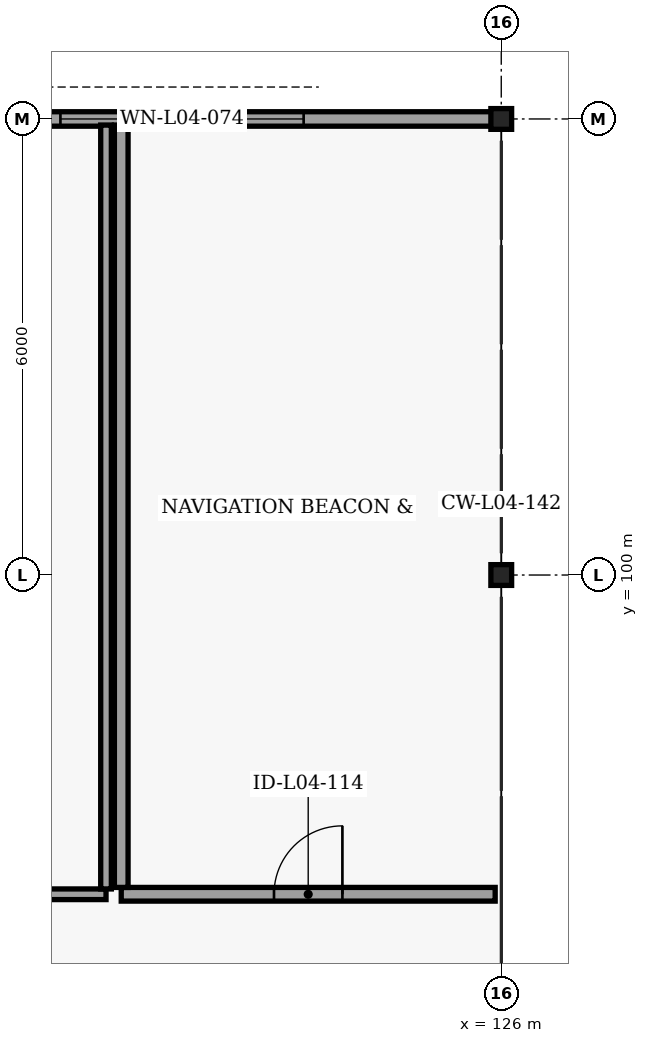
"""IFC4 building model, lengths in metres.
Left out: names, types, materials, properties, quantities, classifications, styles, units other than length and angle.
Written with IfcOpenShell. Run it as: python <this file> out.ifc"""

import sys

from ifc_helpers import new_model, si_unit, direction, frame, frame_2d, origin, origin_2d, place, context, subcontext, project, spatial, rectangle, hollow_circle, extrude, element, fill, save


model = new_model("IFC4")
c1 = context("Model", 3, precision=1e-05, world=origin(), true_north=direction((0.0, 1.0)))
c2 = subcontext(c1, "Body", "Model", "MODEL_VIEW")
j1 = project(units=[si_unit("LENGTHUNIT", "METRE"), si_unit("PLANEANGLEUNIT", "RADIAN")], contexts=[c1])
p1 = place(None, origin())
s1 = spatial("IfcSite", under=j1, at=p1, CompositionType="ELEMENT")
p2 = place(p1, origin())
s2 = spatial("IfcBuilding", under=s1, at=p2, CompositionType="ELEMENT")
p3 = place(p2, frame((0.0, 0.0, 14.4)))
s3 = spatial("IfcBuildingStorey", under=s2, at=p3, CompositionType="ELEMENT", Elevation=14.4)
for number, where, z_axis, x_axis in (
    (1, (126.0, 100.0, 0.0), (0.0, 0.0, 1.0), (1.0, 0.0, 0.0)),
    (2, (126.0, 106.0, 0.0), (0.0, 0.0, 1.0), (1.0, 0.0, 0.0)),
):
    element("IfcColumn", number, at=place(p3, frame(where, z_axis=z_axis, x_axis=x_axis)), inside=s3, PredefinedType="COLUMN", context=c2, shape_type="SweptSolid", body=[
        extrude(hollow_circle(Radius=0.136, WallThickness=0.01, at=origin_2d()), origin(), (0.0, 0.0, 1.0), 3.85),
    ])
p4 = place(p3, frame((117.738, 106.0, 0.0), z_axis=(0.0, 0.0, 1.0), x_axis=(1.0, 0.0, 0.0)))
e3 = element("IfcWall", 3, at=p4, inside=s3, PredefinedType="SOLIDWALL", context=c2, shape_type="SweptSolid", body=[
    extrude(rectangle(XDim=8.14, YDim=0.19, at=frame_2d((4.07, 0.0))), origin(), (0.0, 0.0, 1.0), 3.438),
])
p5 = place(p4, frame((2.462, 0.0, 0.85)))
e4 = element("IfcOpeningElement", 4, at=p5, cuts=e3, PredefinedType="OPENING", context=c2, shape_type="SweptSolid", body=[
    extrude(rectangle(XDim=3.2, YDim=1.8, at=frame_2d((1.6, 0.9))), frame((0.0, 0.105, 0.0), z_axis=(0.0, -1.0, 0.0), x_axis=(1.0, 0.0, 0.0)), (0.0, 0.0, 1.0), 0.21),
])
p6 = place(p3, frame((115.8, 95.8, 0.0), z_axis=(0.0, 0.0, 1.0), x_axis=(1.0, 0.0, 0.0)))
e5 = element("IfcWall", 5, at=p6, inside=s3, PredefinedType="PARTITIONING", context=c2, shape_type="SweptSolid", body=[
    extrude(rectangle(XDim=5.0, YDim=0.14, at=frame_2d((2.5, 0.0))), origin(), (0.0, 0.0, 1.0), 3.44),
])
p7 = place(p6, frame((2.0, 0.0, 0.0)))
e6 = element("IfcOpeningElement", 6, at=p7, cuts=e5, PredefinedType="OPENING", context=c2, shape_type="SweptSolid", body=[
    extrude(rectangle(XDim=1.0, YDim=2.15, at=frame_2d((0.5, 1.075))), frame((0.0, 0.08, 0.0), z_axis=(0.0, -1.0, 0.0), x_axis=(1.0, 0.0, 0.0)), (0.0, 0.0, 1.0), 0.16),
])
p8 = place(p3, frame((120.8, 95.87, 0.0), z_axis=(0.0, 0.0, 1.0), x_axis=(0.0, 1.0, 0.0)))
e7 = element("IfcWall", 7, at=p8, inside=s3, PredefinedType="PARTITIONING", context=c2, shape_type="SweptSolid", body=[
    extrude(rectangle(XDim=10.05, YDim=0.14, at=frame_2d((5.025, 0.0))), origin(), (0.0, 0.0, 1.0), 3.44),
])
p9 = place(p3, frame((121.0, 95.8, 0.0), z_axis=(0.0, 0.0, 1.0), x_axis=(1.0, 0.0, 0.0)))
e8 = element("IfcWall", 8, at=p9, inside=s3, PredefinedType="SOLIDWALL", context=c2, shape_type="SweptSolid", body=[
    extrude(rectangle(XDim=4.92, YDim=0.18, at=frame_2d((2.46, 0.0))), origin(), (0.0, 0.0, 1.0), 3.85),
])
p10 = place(p9, frame((2.01, 0.0, 0.0)))
e9 = element("IfcOpeningElement", 9, at=p10, cuts=e8, PredefinedType="OPENING", context=c2, shape_type="SweptSolid", body=[
    extrude(rectangle(XDim=0.9, YDim=2.15, at=frame_2d((0.45, 1.075))), frame((0.0, 0.1, 0.0), z_axis=(0.0, -1.0, 0.0), x_axis=(1.0, 0.0, 0.0)), (0.0, 0.0, 1.0), 0.2),
])
p11 = place(p3, frame((121.0, 95.89, 0.0), z_axis=(0.0, 0.0, 1.0), x_axis=(0.0, 1.0, 0.0)))
e10 = element("IfcWall", 10, at=p11, inside=s3, PredefinedType="SOLIDWALL", context=c2, shape_type="SweptSolid", body=[
    extrude(rectangle(XDim=10.03, YDim=0.18, at=frame_2d((5.015, 0.0))), origin(), (0.0, 0.0, 1.0), 3.44),
])
p12 = place(p5, origin())
e11 = element("IfcWindow", 11, at=p12, inside=s3, PartitioningType="SINGLE_PANEL", PredefinedType="WINDOW", context=c2, shape_type="SweptSolid", body=[
    extrude(rectangle(XDim=3.2, YDim=1.8, at=frame_2d((1.6, 0.9))), frame((0.0, 0.03, 0.0), z_axis=(0.0, -1.0, 0.0), x_axis=(1.0, 0.0, 0.0)), (0.0, 0.0, 1.0), 0.06),
])
fill(e4, e11)
p13 = place(p10, origin())
e12 = element("IfcDoor", 12, at=p13, inside=s3, OperationType="SINGLE_SWING_RIGHT", PredefinedType="DOOR", context=c2, shape_type="SweptSolid", body=[
    extrude(rectangle(XDim=0.9, YDim=2.15, at=frame_2d((0.45, 1.075))), frame((0.0, 0.025, 0.0), z_axis=(0.0, -1.0, 0.0), x_axis=(1.0, 0.0, 0.0)), (0.0, 0.0, 1.0), 0.05),
])
fill(e9, e12)
save(model, sys.argv[1])
